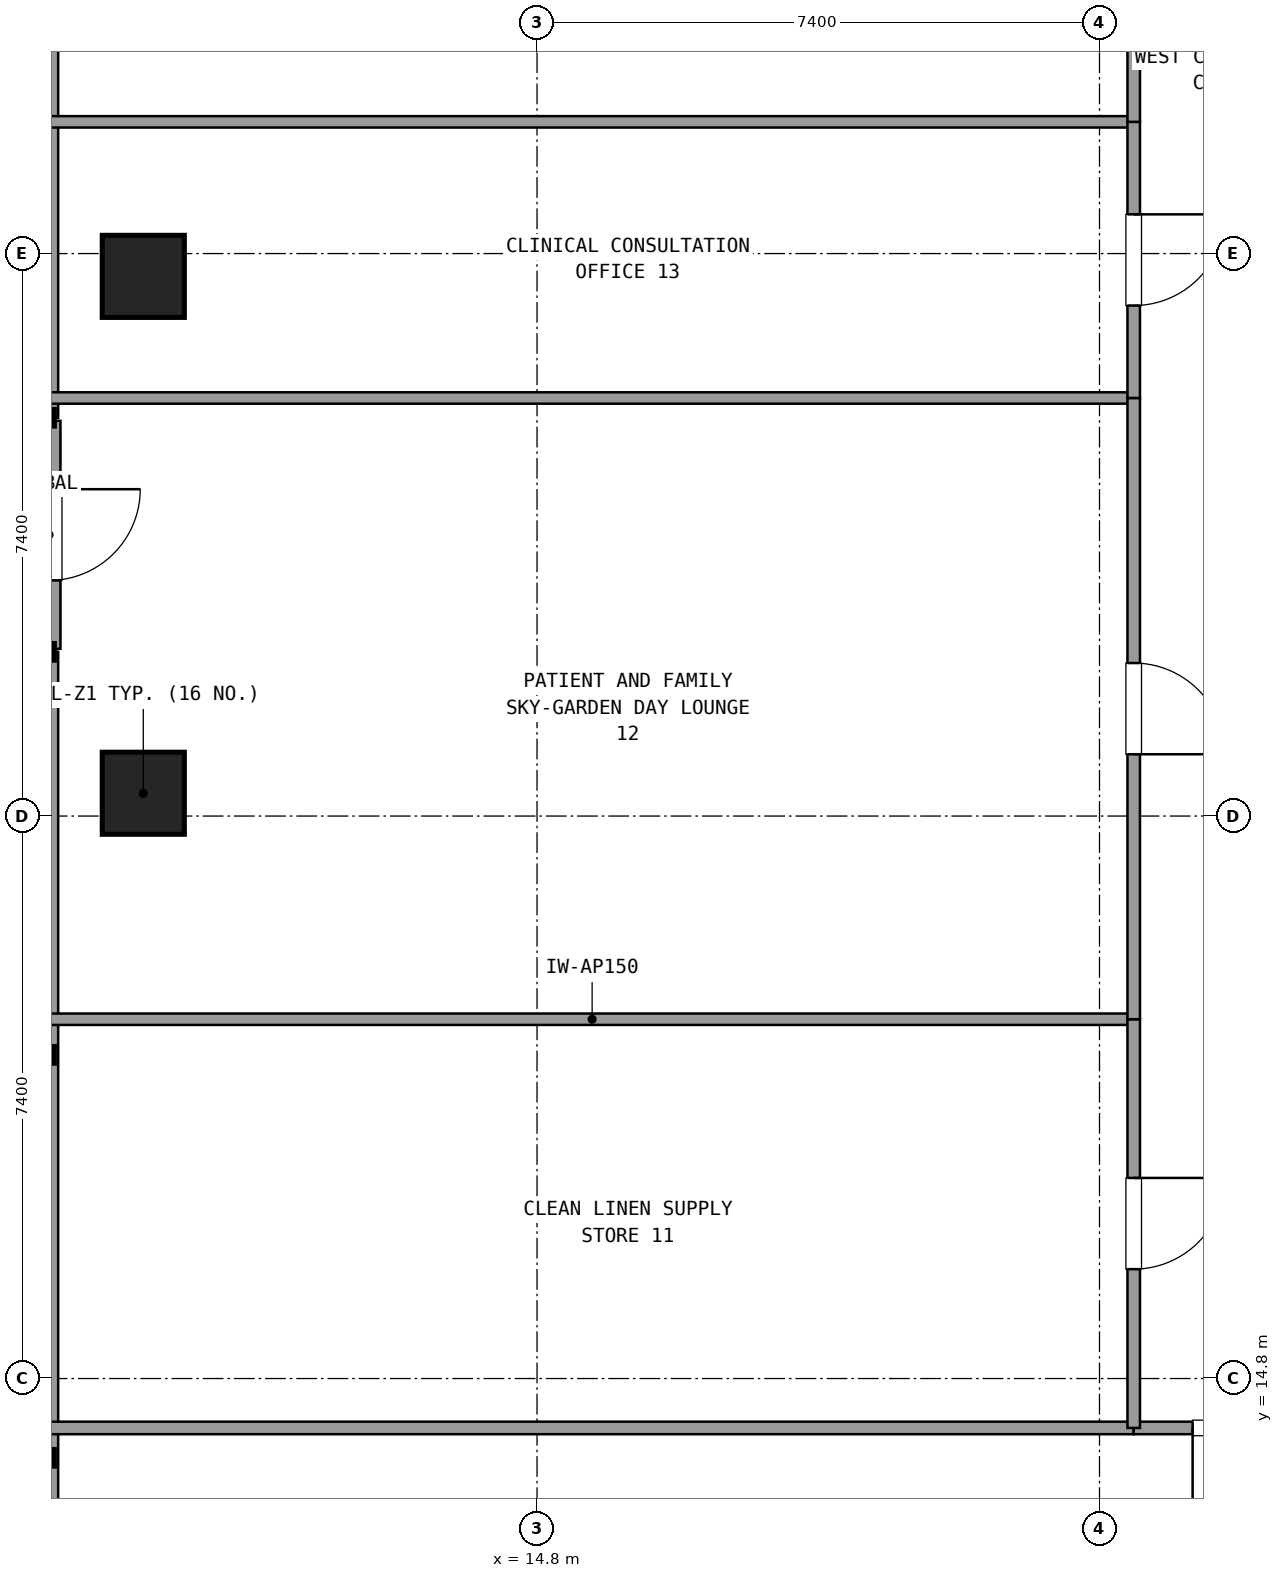
"""IFC4 building model, lengths in metres.
Left out: names, types, materials, properties, quantities, classifications, styles, units other than length and angle.
Written with IfcOpenShell. Run it as: python <this file> out.ifc"""

import sys

from ifc_helpers import new_model, si_unit, direction, frame, frame_2d, origin, origin_2d, place, context, subcontext, project, spatial, rectangle, extrude, element, fill, save


model = new_model("IFC4")
c1 = context("Model", 3, precision=1e-05, world=origin(), true_north=direction((0.0, 1.0)))
c2 = subcontext(c1, "Body", "Model", "MODEL_VIEW")
j1 = project(units=[si_unit("LENGTHUNIT", "METRE"), si_unit("PLANEANGLEUNIT", "RADIAN")], contexts=[c1])
p1 = place(None, origin())
s1 = spatial("IfcSite", under=j1, at=p1, CompositionType="ELEMENT")
p2 = place(p1, origin())
s2 = spatial("IfcBuilding", under=s1, at=p2, CompositionType="ELEMENT")
p3 = place(p2, frame((0.0, 0.0, 41.94)))
s3 = spatial("IfcBuildingStorey", under=s2, at=p3, CompositionType="ELEMENT", Elevation=41.94)
for number, where, z_axis, x_axis in (
    (1, (9.62, 22.5, 0.0), (0.0, 0.0, 1.0), (1.0, 0.0, 0.0)),
    (2, (9.62, 29.3, 0.0), (0.0, 0.0, 1.0), (1.0, 0.0, 0.0)),
):
    element("IfcColumn", number, at=place(p3, frame(where, z_axis=z_axis, x_axis=x_axis)), inside=s3, PredefinedType="COLUMN", context=c2, shape_type="SweptSolid", body=[
        extrude(rectangle(XDim=1.08, YDim=1.08, at=origin_2d()), origin(), (0.0, 0.0, 1.0), 3.6),
    ])
p4 = place(p3, frame((8.38, 27.4, 0.0), z_axis=(0.0, 0.0, 1.0), x_axis=(0.0, -1.0, 0.0)))
e3 = element("IfcWall", 3, at=p4, inside=s3, PredefinedType="SOLIDWALL", context=c2, shape_type="SweptSolid", body=[
    extrude(rectangle(XDim=3.0, YDim=0.3, at=frame_2d((1.5, 0.0))), origin(), (0.0, 0.0, 1.0), 2.65),
])
p5 = place(p4, frame((0.9, 0.0, 0.0)))
e4 = element("IfcOpeningElement", 4, at=p5, cuts=e3, PredefinedType="OPENING", context=c2, shape_type="SweptSolid", body=[
    extrude(rectangle(XDim=1.2, YDim=2.2, at=frame_2d((0.6, 1.1))), frame((0.0, 0.16, 0.0), z_axis=(0.0, -1.0, 0.0), x_axis=(1.0, 0.0, 0.0)), (0.0, 0.0, 1.0), 0.32),
])
for number, where, z_axis, x_axis in (
    (5, (8.38, 43.345, 0.0), (0.0, 0.0, 1.0), (0.0, -1.0, 0.0)),
    (6, (8.38, 24.36, 0.0), (0.0, 0.0, 1.0), (0.0, -1.0, 0.0)),
):
    element("IfcWall", number, at=place(p3, frame(where, z_axis=z_axis, x_axis=x_axis)), inside=s3, PredefinedType="SOLIDWALL", context=c2, shape_type="SweptSolid", body=[
        extrude(rectangle(XDim=15.905, YDim=0.24, at=frame_2d((7.953, 0.0))), origin(), (0.0, 0.0, 1.0), 0.85),
    ])
p6 = place(p3, frame((8.4, 14.15, 0.0), z_axis=(0.0, 0.0, 1.0), x_axis=(1.0, 0.0, 0.0)))
e7 = element("IfcWall", 7, at=p6, inside=s3, PredefinedType="PARTITIONING", context=c2, shape_type="SweptSolid", body=[
    extrude(rectangle(XDim=14.25, YDim=0.165, at=frame_2d((7.125, 0.0))), origin(), (0.0, 0.0, 1.0), 2.61),
])
p7 = place(p3, frame((22.65, 14.15, 0.0), z_axis=(0.0, 0.0, 1.0), x_axis=(1.0, 0.0, 0.0)))
e8 = element("IfcWall", 8, at=p7, inside=s3, PredefinedType="PARTITIONING", context=c2, shape_type="SweptSolid", body=[
    extrude(rectangle(XDim=2.55, YDim=0.165, at=frame_2d((1.275, 0.0))), origin(), (0.0, 0.0, 1.0), 2.61),
])
p8 = place(p7, frame((0.775, 0.0, 0.0)))
e9 = element("IfcOpeningElement", 9, at=p8, cuts=e8, PredefinedType="OPENING", context=c2, shape_type="SweptSolid", body=[
    extrude(rectangle(XDim=1.0, YDim=2.15, at=frame_2d((0.5, 1.075))), frame((0.0, 0.093, 0.0), z_axis=(0.0, -1.0, 0.0), x_axis=(1.0, 0.0, 0.0)), (0.0, 0.0, 1.0), 0.185),
])
p9 = place(p3, frame((22.65, 19.527, 0.0), z_axis=(0.0, 0.0, 1.0), x_axis=(-1.0, 0.0, 0.0)))
e10 = element("IfcWall", 10, at=p9, inside=s3, PredefinedType="PARTITIONING", context=c2, shape_type="SweptSolid", body=[
    extrude(rectangle(XDim=14.25, YDim=0.15, at=frame_2d((7.125, 0.0))), origin(), (0.0, 0.0, 1.0), 2.61),
])
p10 = place(p3, frame((22.65, 14.15, 0.0), z_axis=(0.0, 0.0, 1.0), x_axis=(0.0, 1.0, 0.0)))
e11 = element("IfcWall", 11, at=p10, inside=s3, PredefinedType="PARTITIONING", context=c2, shape_type="SweptSolid", body=[
    extrude(rectangle(XDim=5.377, YDim=0.165, at=frame_2d((2.688, 0.0))), origin(), (0.0, 0.0, 1.0), 2.61),
])
p11 = place(p10, frame((2.089, 0.0, 0.0)))
e12 = element("IfcOpeningElement", 12, at=p11, cuts=e11, PredefinedType="OPENING", context=c2, shape_type="SweptSolid", body=[
    extrude(rectangle(XDim=1.2, YDim=2.15, at=frame_2d((0.6, 1.075))), frame((0.0, 0.093, 0.0), z_axis=(0.0, -1.0, 0.0), x_axis=(1.0, 0.0, 0.0)), (0.0, 0.0, 1.0), 0.185),
])
p12 = place(p3, frame((22.65, 27.7, 0.0), z_axis=(0.0, 0.0, 1.0), x_axis=(-1.0, 0.0, 0.0)))
e13 = element("IfcWall", 13, at=p12, inside=s3, PredefinedType="PARTITIONING", context=c2, shape_type="SweptSolid", body=[
    extrude(rectangle(XDim=14.25, YDim=0.15, at=frame_2d((7.125, 0.0))), origin(), (0.0, 0.0, 1.0), 2.61),
])
p13 = place(p3, frame((22.65, 19.527, 0.0), z_axis=(0.0, 0.0, 1.0), x_axis=(0.0, 1.0, 0.0)))
e14 = element("IfcWall", 14, at=p13, inside=s3, PredefinedType="PARTITIONING", context=c2, shape_type="SweptSolid", body=[
    extrude(rectangle(XDim=8.173, YDim=0.165, at=frame_2d((4.086, 0.0))), origin(), (0.0, 0.0, 1.0), 2.61),
])
p14 = place(p13, frame((3.486, 0.0, 0.0)))
e15 = element("IfcOpeningElement", 15, at=p14, cuts=e14, PredefinedType="OPENING", context=c2, shape_type="SweptSolid", body=[
    extrude(rectangle(XDim=1.2, YDim=2.15, at=frame_2d((0.6, 1.075))), frame((0.0, 0.093, 0.0), z_axis=(0.0, -1.0, 0.0), x_axis=(1.0, 0.0, 0.0)), (0.0, 0.0, 1.0), 0.185),
])
p15 = place(p3, frame((22.65, 31.333, 0.0), z_axis=(0.0, 0.0, 1.0), x_axis=(-1.0, 0.0, 0.0)))
e16 = element("IfcWall", 16, at=p15, inside=s3, PredefinedType="PARTITIONING", context=c2, shape_type="SweptSolid", body=[
    extrude(rectangle(XDim=14.25, YDim=0.15, at=frame_2d((7.125, 0.0))), origin(), (0.0, 0.0, 1.0), 2.61),
])
p16 = place(p3, frame((22.65, 27.7, 0.0), z_axis=(0.0, 0.0, 1.0), x_axis=(0.0, 1.0, 0.0)))
e17 = element("IfcWall", 17, at=p16, inside=s3, PredefinedType="PARTITIONING", context=c2, shape_type="SweptSolid", body=[
    extrude(rectangle(XDim=3.633, YDim=0.165, at=frame_2d((1.816, 0.0))), origin(), (0.0, 0.0, 1.0), 2.61),
])
p17 = place(p16, frame((1.216, 0.0, 0.0)))
e18 = element("IfcOpeningElement", 18, at=p17, cuts=e17, PredefinedType="OPENING", context=c2, shape_type="SweptSolid", body=[
    extrude(rectangle(XDim=1.2, YDim=2.15, at=frame_2d((0.6, 1.075))), frame((0.0, 0.093, 0.0), z_axis=(0.0, -1.0, 0.0), x_axis=(1.0, 0.0, 0.0)), (0.0, 0.0, 1.0), 0.185),
])
p18 = place(p3, frame((22.65, 31.333, 0.0), z_axis=(0.0, 0.0, 1.0), x_axis=(0.0, 1.0, 0.0)))
e19 = element("IfcWall", 19, at=p18, inside=s3, PredefinedType="PARTITIONING", context=c2, shape_type="SweptSolid", body=[
    extrude(rectangle(XDim=6.317, YDim=0.165, at=frame_2d((3.158, 0.0))), origin(), (0.0, 0.0, 1.0), 2.61),
])
p19 = place(p18, frame((2.558, 0.0, 0.0)))
e20 = element("IfcOpeningElement", 20, at=p19, cuts=e19, PredefinedType="OPENING", context=c2, shape_type="SweptSolid", body=[
    extrude(rectangle(XDim=1.2, YDim=2.15, at=frame_2d((0.6, 1.075))), frame((0.0, 0.093, 0.0), z_axis=(0.0, -1.0, 0.0), x_axis=(1.0, 0.0, 0.0)), (0.0, 0.0, 1.0), 0.185),
])
p20 = place(p8, frame((1.0, 0.0, 0.0), z_axis=(0.0, 0.0, 1.0), x_axis=(-1.0, 0.0, 0.0)))
e21 = element("IfcDoor", 21, at=p20, inside=s3, OperationType="SINGLE_SWING_LEFT", PredefinedType="DOOR", context=c2, shape_type="SweptSolid", body=[
    extrude(rectangle(XDim=1.0, YDim=2.15, at=frame_2d((0.5, 1.075))), frame((0.0, 0.025, 0.0), z_axis=(0.0, -1.0, 0.0), x_axis=(1.0, 0.0, 0.0)), (0.0, 0.0, 1.0), 0.05),
])
fill(e9, e21)
p21 = place(p11, frame((1.2, 0.0, 0.0), z_axis=(0.0, 0.0, 1.0), x_axis=(-1.0, 0.0, 0.0)))
e22 = element("IfcDoor", 22, at=p21, inside=s3, OperationType="SINGLE_SWING_RIGHT", PredefinedType="DOOR", context=c2, shape_type="SweptSolid", body=[
    extrude(rectangle(XDim=1.2, YDim=2.15, at=frame_2d((0.6, 1.075))), frame((0.0, 0.025, 0.0), z_axis=(0.0, -1.0, 0.0), x_axis=(1.0, 0.0, 0.0)), (0.0, 0.0, 1.0), 0.05),
])
fill(e12, e22)
p22 = place(p14, frame((1.2, 0.0, 0.0), z_axis=(0.0, 0.0, 1.0), x_axis=(-1.0, 0.0, 0.0)))
e23 = element("IfcDoor", 23, at=p22, inside=s3, OperationType="SINGLE_SWING_LEFT", PredefinedType="DOOR", context=c2, shape_type="SweptSolid", body=[
    extrude(rectangle(XDim=1.2, YDim=2.15, at=frame_2d((0.6, 1.075))), frame((0.0, 0.025, 0.0), z_axis=(0.0, -1.0, 0.0), x_axis=(1.0, 0.0, 0.0)), (0.0, 0.0, 1.0), 0.05),
])
fill(e15, e23)
p23 = place(p17, frame((1.2, 0.0, 0.0), z_axis=(0.0, 0.0, 1.0), x_axis=(-1.0, 0.0, 0.0)))
e24 = element("IfcDoor", 24, at=p23, inside=s3, OperationType="SINGLE_SWING_RIGHT", PredefinedType="DOOR", context=c2, shape_type="SweptSolid", body=[
    extrude(rectangle(XDim=1.2, YDim=2.15, at=frame_2d((0.6, 1.075))), frame((0.0, 0.025, 0.0), z_axis=(0.0, -1.0, 0.0), x_axis=(1.0, 0.0, 0.0)), (0.0, 0.0, 1.0), 0.05),
])
fill(e18, e24)
save(model, sys.argv[1])
